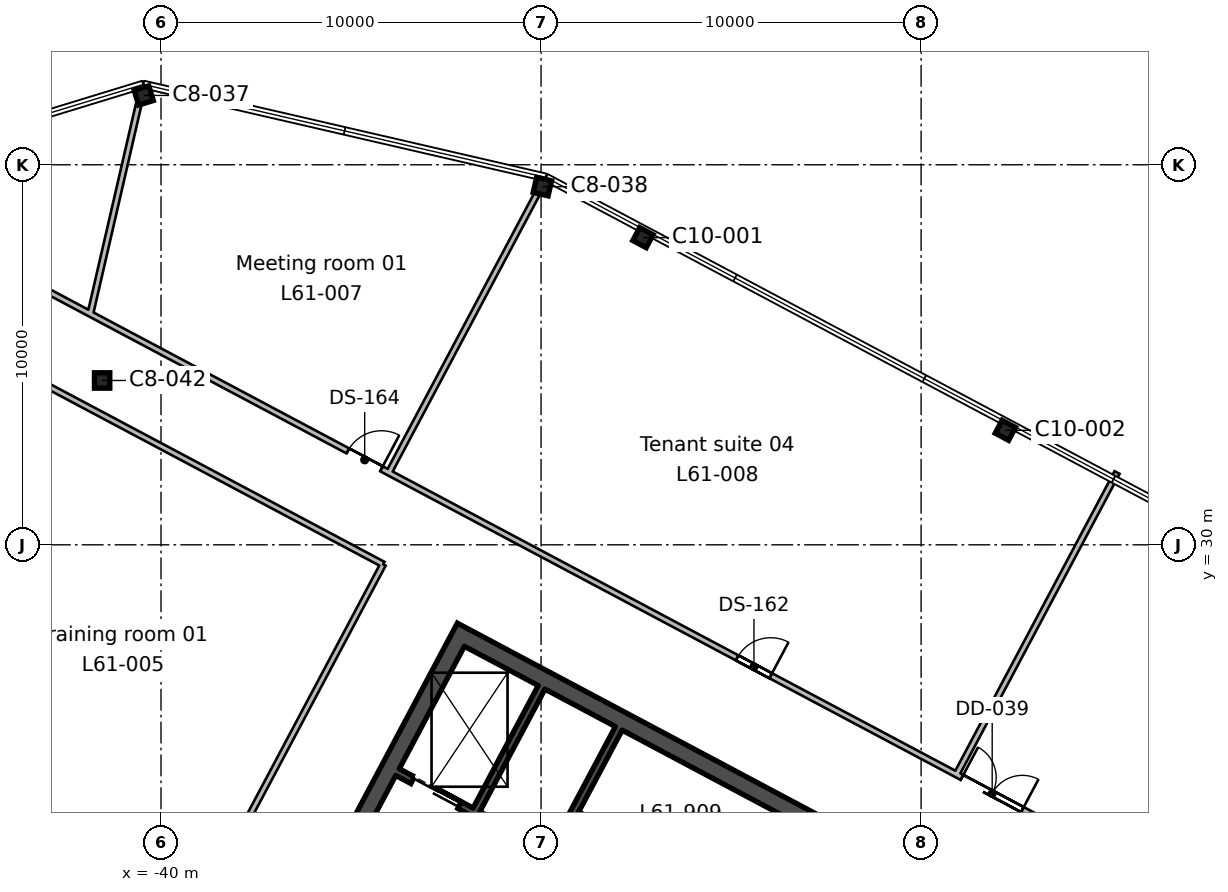
"""IFC4 building model, lengths in metres.
Left out: names, types, materials, properties, quantities, classifications, styles, units other than length and angle.
Written with IfcOpenShell. Run it as: python <this file> out.ifc"""

import sys

from ifc_helpers import new_model, si_unit, direction, frame, frame_2d, origin, origin_2d, place, context, subcontext, project, spatial, rectangle, i_section, extrude, element, fill, save


model = new_model("IFC4")
c1 = context("Model", 3, precision=1e-05, world=origin(), true_north=direction((0.0, 1.0)))
c2 = subcontext(c1, "Body", "Model", "MODEL_VIEW")
j1 = project(units=[si_unit("LENGTHUNIT", "METRE"), si_unit("PLANEANGLEUNIT", "RADIAN")], contexts=[c1])
p1 = place(None, origin())
s1 = spatial("IfcSite", under=j1, at=p1, CompositionType="ELEMENT")
p2 = place(p1, origin())
s2 = spatial("IfcBuilding", under=s1, at=p2, CompositionType="ELEMENT")
p3 = place(p2, frame((0.0, 0.0, 273.6)))
s3 = spatial("IfcBuildingStorey", under=s2, at=p3, CompositionType="ELEMENT", Elevation=273.6)
p4 = place(p3, frame((-17.783, 33.013, 0.0), z_axis=(0.0, 0.0, 1.0), x_axis=(-0.882947592859, 0.469471562786, 0.0)))
e1 = element("IfcColumn", 1, at=p4, inside=s3, PredefinedType="COLUMN", context=c2, shape_type="SweptSolid", body=[
    extrude(i_section(OverallWidth=0.399, OverallDepth=0.386, WebThickness=0.021, FlangeThickness=0.033, FilletRadius=0.015, at=origin_2d()), origin(), (0.0, 0.0, 1.0), 3.9),
])
p5 = place(p3, frame((-41.549, 34.324, 0.0), z_axis=(0.0, 0.0, 1.0), x_axis=(1.0, 0.0, 0.0)))
e2 = element("IfcColumn", 2, at=p5, inside=s3, PredefinedType="COLUMN", context=c2, shape_type="SweptSolid", body=[
    extrude(i_section(OverallWidth=0.404, OverallDepth=0.406, WebThickness=0.027, FlangeThickness=0.044, FilletRadius=0.015, at=origin_2d()), origin(), (0.0, 0.0, 1.0), 3.9),
])
p6 = place(p3, frame((-27.319, 38.083, 0.0), z_axis=(0.0, 0.0, 1.0), x_axis=(-0.882947592859, 0.469471562786, 0.0)))
e3 = element("IfcColumn", 3, at=p6, inside=s3, PredefinedType="COLUMN", context=c2, shape_type="SweptSolid", body=[
    extrude(i_section(OverallWidth=0.399, OverallDepth=0.386, WebThickness=0.021, FlangeThickness=0.033, FilletRadius=0.015, at=origin_2d()), origin(), (0.0, 0.0, 1.0), 3.9),
])
for number, where, z_axis, x_axis in (
    (4, (-29.965, 39.425, 0.0), (0.0, 0.0, 1.0), (-0.974, 0.225, 0.0)),
    (5, (-40.455, 41.824, 0.0), (0.0, 0.0, 1.0), (-0.956, -0.292, 0.0)),
):
    element("IfcColumn", number, at=place(p3, frame(where, z_axis=z_axis, x_axis=x_axis)), inside=s3, PredefinedType="COLUMN", context=c2, shape_type="SweptSolid", body=[
        extrude(i_section(OverallWidth=0.404, OverallDepth=0.406, WebThickness=0.027, FlangeThickness=0.044, FilletRadius=0.015, at=origin_2d()), origin(), (0.0, 0.0, 1.0), 3.9),
    ])
p7 = place(p3, frame((-32.004, 27.833, 0.0), z_axis=(0.0, 0.0, 1.0), x_axis=(-0.469467968382, -0.882949504028, 0.0)))
e6 = element("IfcWall", 6, at=p7, inside=s3, PredefinedType="SHEAR", context=c2, shape_type="SweptSolid", body=[
    extrude(rectangle(XDim=19.1, YDim=0.45, at=frame_2d((9.55, 0.0))), origin(), (0.0, 0.0, 1.0), 3.9),
])
p8 = place(p7, frame((10.15, 0.0, 0.0)))
e7 = element("IfcOpeningElement", 7, at=p8, cuts=e6, PredefinedType="OPENING", context=c2, shape_type="SweptSolid", body=[
    extrude(rectangle(XDim=2.4, YDim=2.4, at=frame_2d((1.2, 1.2))), frame((0.0, 0.235, 0.0), z_axis=(0.0, -1.0, 0.0), x_axis=(1.0, 0.0, 0.0)), (0.0, 0.0, 1.0), 0.47),
])
p9 = place(p3, frame((-14.076, 18.045, 0.0), z_axis=(0.0, 0.0, 1.0), x_axis=(-0.882947755831, 0.46947125628, 0.0)))
e8 = element("IfcWall", 8, at=p9, inside=s3, PredefinedType="SHEAR", context=c2, shape_type="SweptSolid", body=[
    extrude(rectangle(XDim=20.2, YDim=0.45, at=frame_2d((10.1, 0.0))), origin(), (0.0, 0.0, 1.0), 3.9),
])
p10 = place(p3, frame((-27.955, 25.171, 0.0), z_axis=(0.0, 0.0, 1.0), x_axis=(-0.469480409012, -0.88294288918, 0.0)))
e9 = element("IfcWall", 9, at=p10, inside=s3, PredefinedType="SHEAR", context=c2, shape_type="SweptSolid", body=[
    extrude(rectangle(XDim=7.3, YDim=0.2, at=frame_2d((3.65, 0.0))), origin(), (0.0, 0.0, 1.0), 3.9),
])
p11 = place(p3, frame((-29.986, 26.25, 0.0), z_axis=(0.0, 0.0, 1.0), x_axis=(-0.469494272526, -0.882935517501, 0.0)))
e10 = element("IfcWall", 10, at=p11, inside=s3, PredefinedType="SHEAR", context=c2, shape_type="SweptSolid", body=[
    extrude(rectangle(XDim=3.65, YDim=0.2, at=frame_2d((1.825, 0.0))), origin(), (0.0, 0.0, 1.0), 3.9),
])
p12 = place(p3, frame((-24.449, 20.475, 0.0), z_axis=(0.0, 0.0, 1.0), x_axis=(-0.882934506056, 0.469496174655, 0.0)))
e11 = element("IfcWall", 11, at=p12, inside=s3, PredefinedType="SOLIDWALL", context=c2, shape_type="SweptSolid", body=[
    extrude(rectangle(XDim=5.2, YDim=0.2, at=frame_2d((2.6, 0.0))), origin(), (0.0, 0.0, 1.0), 3.9),
])
p13 = place(p3, frame((-29.804, 21.906, 0.0), z_axis=(0.0, 0.0, 1.0), x_axis=(-0.882960433586, 0.469447412093, 0.0)))
e12 = element("IfcWall", 12, at=p13, inside=s3, PredefinedType="SHEAR", context=c2, shape_type="SweptSolid", body=[
    extrude(rectangle(XDim=4.5, YDim=0.2, at=frame_2d((2.25, 0.0))), origin(), (0.0, 0.0, 1.0), 3.9),
])
p14 = place(p13, frame((2.65, 0.0, 0.0)))
e13 = element("IfcOpeningElement", 13, at=p14, cuts=e12, PredefinedType="OPENING", context=c2, shape_type="SweptSolid", body=[
    extrude(rectangle(XDim=1.4, YDim=2.4, at=frame_2d((0.7, 1.2))), frame((0.0, 0.11, 0.0), z_axis=(0.0, -1.0, 0.0), x_axis=(1.0, 0.0, 0.0)), (0.0, 0.0, 1.0), 0.22),
])
p15 = place(p3, frame((-48.812, 39.771, 0.0), z_axis=(0.0, 0.0, 1.0), x_axis=(0.882945384259, -0.469475716535, 0.0)))
e14 = element("IfcWall", 14, at=p15, inside=s3, PredefinedType="PARTITIONING", context=c2, shape_type="SweptSolid", body=[
    extrude(rectangle(XDim=55.283, YDim=0.15, at=frame_2d((27.642, 0.0))), origin(), (0.0, 0.0, 1.0), 3.54),
])
p16 = place(p15, frame((33.85, 0.0, 0.0)))
e15 = element("IfcOpeningElement", 15, at=p16, cuts=e14, PredefinedType="OPENING", context=c2, shape_type="SweptSolid", body=[
    extrude(rectangle(XDim=1.8, YDim=2.1, at=frame_2d((0.9, 1.05))), frame((0.0, 0.085, 0.0), z_axis=(0.0, -1.0, 0.0), x_axis=(1.0, 0.0, 0.0)), (0.0, 0.0, 1.0), 0.17),
])
p17 = place(p15, frame((27.15, 0.0, 0.0)))
e16 = element("IfcOpeningElement", 16, at=p17, cuts=e14, PredefinedType="OPENING", context=c2, shape_type="SweptSolid", body=[
    extrude(rectangle(XDim=1.0, YDim=2.1, at=frame_2d((0.5, 1.05))), frame((0.0, 0.085, 0.0), z_axis=(0.0, -1.0, 0.0), x_axis=(1.0, 0.0, 0.0)), (0.0, 0.0, 1.0), 0.17),
])
p18 = place(p15, frame((15.55, 0.0, 0.0)))
e17 = element("IfcOpeningElement", 17, at=p18, cuts=e14, PredefinedType="OPENING", context=c2, shape_type="SweptSolid", body=[
    extrude(rectangle(XDim=1.0, YDim=2.1, at=frame_2d((0.5, 1.05))), frame((0.0, 0.085, 0.0), z_axis=(0.0, -1.0, 0.0), x_axis=(1.0, 0.0, 0.0)), (0.0, 0.0, 1.0), 0.17),
])
p19 = place(p3, frame((-42.984, 34.181, 0.0), z_axis=(0.0, 0.0, 1.0), x_axis=(0.882929457898, -0.469505668097, 0.0)))
e18 = element("IfcWall", 18, at=p19, inside=s3, PredefinedType="PARTITIONING", context=c2, shape_type="SweptSolid", body=[
    extrude(rectangle(XDim=10.0, YDim=0.15, at=frame_2d((5.0, 0.0))), origin(), (0.0, 0.0, 1.0), 3.54),
])
p20 = place(p3, frame((-34.155, 29.486, 0.0), z_axis=(0.0, 0.0, 1.0), x_axis=(-0.469446756585, -0.882960782103, 0.0)))
e19 = element("IfcWall", 19, at=p20, inside=s3, PredefinedType="PARTITIONING", context=c2, shape_type="SweptSolid", body=[
    extrude(rectangle(XDim=20.0, YDim=0.15, at=frame_2d((10.0, 0.0))), origin(), (0.0, 0.0, 1.0), 3.54),
])
p21 = place(p3, frame((-30.098, 39.247, 0.0), z_axis=(0.0, 0.0, 1.0), x_axis=(-0.469413996391, -0.882978199047, 0.0)))
e20 = element("IfcWall", 20, at=p21, inside=s3, PredefinedType="PARTITIONING", context=c2, shape_type="SweptSolid", body=[
    extrude(rectangle(XDim=8.323, YDim=0.15, at=frame_2d((4.162, 0.0))), origin(), (0.0, 0.0, 1.0), 3.54),
])
p22 = place(p3, frame((-41.86, 36.075, 0.0), z_axis=(0.0, 0.0, 1.0), x_axis=(0.22499217369, 0.974360570722, 0.0)))
e21 = element("IfcWall", 21, at=p22, inside=s3, PredefinedType="PARTITIONING", context=c2, shape_type="SweptSolid", body=[
    extrude(rectangle(XDim=5.645, YDim=0.15, at=frame_2d((2.822, 0.0))), origin(), (0.0, 0.0, 1.0), 3.54),
])
p23 = place(p3, frame((-14.844, 31.903, 0.0), z_axis=(0.0, 0.0, 1.0), x_axis=(-0.469351570135, -0.883011383625, 0.0)))
e22 = element("IfcWall", 22, at=p23, inside=s3, PredefinedType="PARTITIONING", context=c2, shape_type="SweptSolid", body=[
    extrude(rectangle(XDim=9.0, YDim=0.15, at=frame_2d((4.5, 0.0))), origin(), (0.0, 0.0, 1.0), 3.54),
])
p24 = place(p14, origin())
e23 = element("IfcDoor", 23, at=p24, inside=s3, OperationType="DOUBLE_DOOR_SLIDING", PredefinedType="DOOR", context=c2, shape_type="SweptSolid", body=[
    extrude(rectangle(XDim=1.4, YDim=2.4, at=frame_2d((0.7, 1.2))), frame((0.0, 0.025, 0.0), z_axis=(0.0, -1.0, 0.0), x_axis=(1.0, 0.0, 0.0)), (0.0, 0.0, 1.0), 0.05),
])
fill(e13, e23)
p25 = place(p16, origin())
e24 = element("IfcDoor", 24, at=p25, inside=s3, OperationType="DOUBLE_DOOR_SINGLE_SWING", PredefinedType="DOOR", context=c2, shape_type="SweptSolid", body=[
    extrude(rectangle(XDim=1.8, YDim=2.1, at=frame_2d((0.9, 1.05))), frame((0.0, 0.025, 0.0), z_axis=(0.0, -1.0, 0.0), x_axis=(1.0, 0.0, 0.0)), (0.0, 0.0, 1.0), 0.05),
])
fill(e15, e24)
p26 = place(p17, origin())
e25 = element("IfcDoor", 25, at=p26, inside=s3, OperationType="SINGLE_SWING_RIGHT", PredefinedType="DOOR", context=c2, shape_type="SweptSolid", body=[
    extrude(rectangle(XDim=1.0, YDim=2.1, at=frame_2d((0.5, 1.05))), frame((0.0, 0.025, 0.0), z_axis=(0.0, -1.0, 0.0), x_axis=(1.0, 0.0, 0.0)), (0.0, 0.0, 1.0), 0.05),
])
fill(e16, e25)
p27 = place(p18, origin())
e26 = element("IfcDoor", 26, at=p27, inside=s3, OperationType="SINGLE_SWING_RIGHT", PredefinedType="DOOR", context=c2, shape_type="SweptSolid", body=[
    extrude(rectangle(XDim=1.0, YDim=2.1, at=frame_2d((0.5, 1.05))), frame((0.0, 0.025, 0.0), z_axis=(0.0, -1.0, 0.0), x_axis=(1.0, 0.0, 0.0)), (0.0, 0.0, 1.0), 0.05),
])
fill(e17, e26)
save(model, sys.argv[1])
